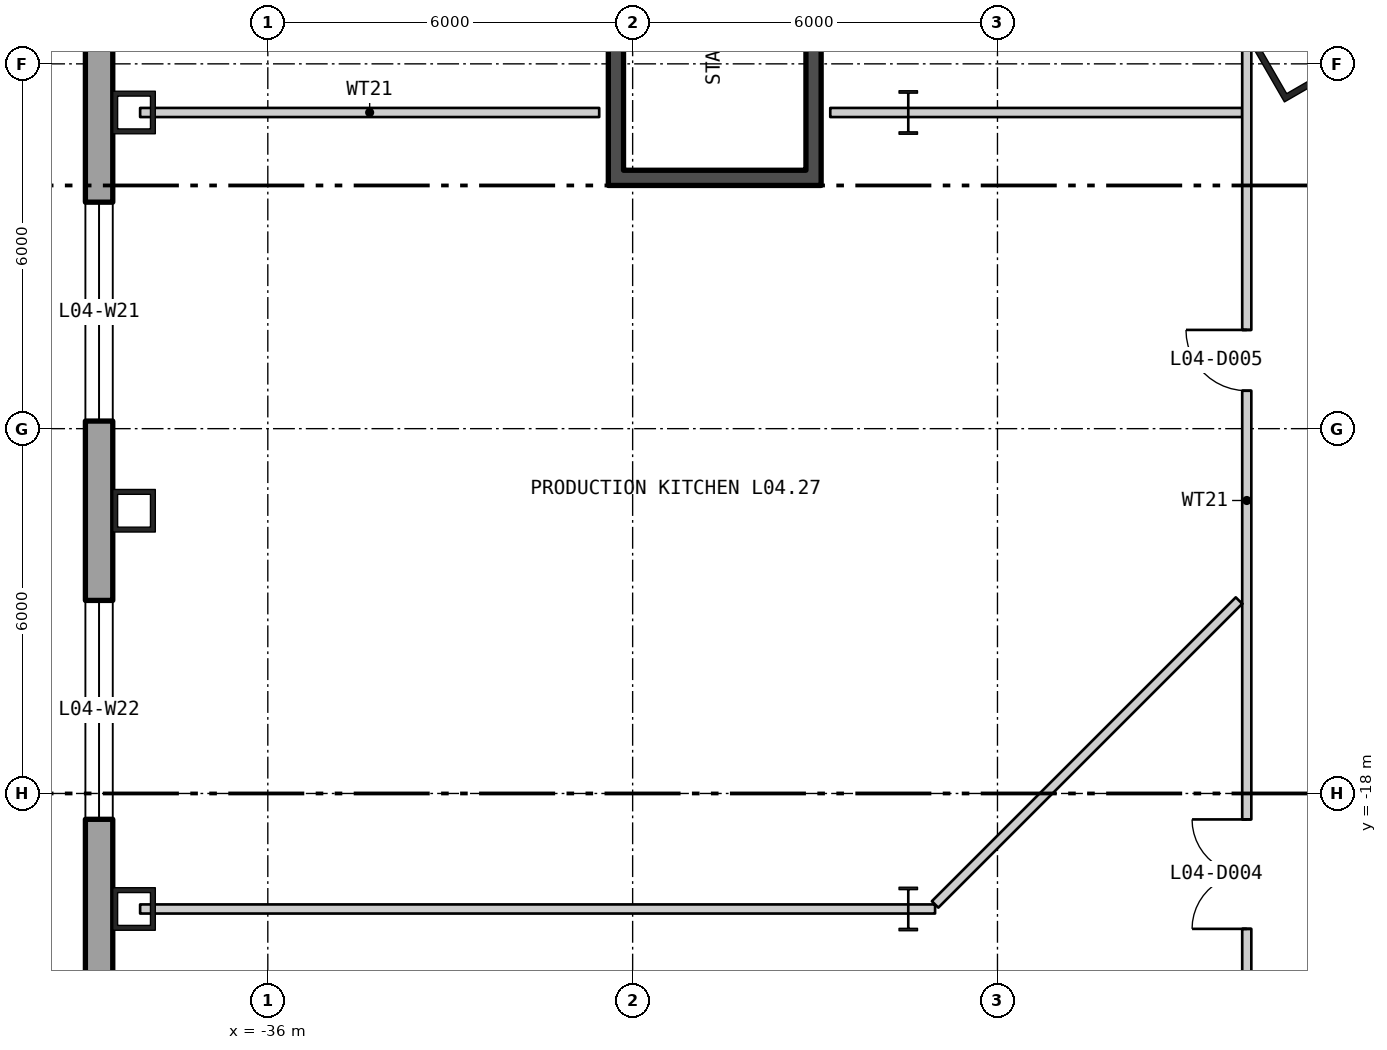
"""IFC4 building model, lengths in metres.
Left out: names, types, materials, properties, quantities, classifications, styles, units other than length and angle.
Written with IfcOpenShell. Run it as: python <this file> out.ifc"""

import sys

from ifc_helpers import new_model, si_unit, direction, frame, frame_2d, origin, origin_2d, place, context, subcontext, project, spatial, polyline, rectangle, hollow_rectangle, i_section, outline, extrude, element, fill, save


model = new_model("IFC4")
c1 = context("Model", 3, precision=1e-05, world=origin(), true_north=direction((0.0, 1.0)))
c2 = subcontext(c1, "Body", "Model", "MODEL_VIEW")
j1 = project(units=[si_unit("LENGTHUNIT", "METRE"), si_unit("PLANEANGLEUNIT", "RADIAN")], contexts=[c1])
p1 = place(None, origin())
s1 = spatial("IfcSite", under=j1, at=p1, CompositionType="ELEMENT")
p2 = place(p1, origin())
s2 = spatial("IfcBuilding", under=s1, at=p2, CompositionType="ELEMENT")
p3 = place(p2, frame((0.0, 0.0, 23.7)))
s3 = spatial("IfcBuildingStorey", under=s2, at=p3, CompositionType="ELEMENT", Elevation=23.7)
p4 = place(p3, frame((-19.061, -5.807, 0.0), z_axis=(0.0, 0.0, 1.0), x_axis=(0.5, -0.866025403784, 0.0)))
e1 = element("IfcColumn", 1, at=p4, inside=s3, PredefinedType="COLUMN", context=c2, shape_type="SweptSolid", body=[
    extrude(hollow_rectangle(XDim=1.2, YDim=1.2, WallThickness=0.1, at=origin_2d()), origin(), (0.0, 0.0, 1.0), 5.1),
])
for number, where, z_axis, x_axis in (
    (2, (-38.2, -6.8, 0.0), (0.0, 0.0, 1.0), (0.0, -1.0, 0.0)),
    (3, (-38.2, -13.35, 0.0), (0.0, 0.0, 1.0), (0.0, -1.0, 0.0)),
    (4, (-38.2, -19.9, 0.0), (0.0, 0.0, 1.0), (0.0, -1.0, 0.0)),
):
    element("IfcColumn", number, at=place(p3, frame(where, z_axis=z_axis, x_axis=x_axis)), inside=s3, PredefinedType="COLUMN", context=c2, shape_type="SweptSolid", body=[
        extrude(hollow_rectangle(XDim=0.7, YDim=0.7, WallThickness=0.08, at=origin_2d()), origin(), (0.0, 0.0, 1.0), 4.85),
    ])
for number, where, z_axis, x_axis in (
    (5, (-25.467, -6.8, 0.0), (0.0, 0.0, 1.0), (1.0, 0.0, 0.0)),
    (6, (-25.467, -19.9, 0.0), (0.0, 0.0, 1.0), (1.0, 0.0, 0.0)),
):
    element("IfcColumn", number, at=place(p3, frame(where, z_axis=z_axis, x_axis=x_axis)), inside=s3, PredefinedType="COLUMN", context=c2, shape_type="SweptSolid", body=[
        extrude(i_section(OverallWidth=0.304, OverallDepth=0.716, WebThickness=0.021, FlangeThickness=0.04, at=origin_2d()), origin(), (0.0, 0.0, 1.0), 4.85),
    ])
p5 = place(p3, frame((-38.775, 19.975, -0.4), z_axis=(0.0, 0.0, 1.0), x_axis=(0.0, -1.0, 0.0)))
e7 = element("IfcWall", 7, at=p5, inside=s3, PredefinedType="SOLIDWALL", context=c2, shape_type="SweptSolid", body=[
    extrude(outline(polyline([(-0.225, -0.225), (53.775, -0.225), (53.325, 0.225), (0.225, 0.225), (-0.225, -0.225)])), origin(), (0.0, 0.0, 1.0), 5.1),
])
p6 = place(p5, frame((2.05, 0.0, 1.3)))
e8 = element("IfcOpeningElement", 8, at=p6, cuts=e7, PredefinedType="OPENING", context=c2, shape_type="SweptSolid", body=[
    extrude(rectangle(XDim=3.6, YDim=3.2, at=frame_2d((1.8, 1.6))), frame((0.0, 0.235, 0.0), z_axis=(0.0, -1.0, 0.0), x_axis=(1.0, 0.0, 0.0)), (0.0, 0.0, 1.0), 0.47),
])
p7 = place(p5, frame((8.6, 0.0, 1.3)))
e9 = element("IfcOpeningElement", 9, at=p7, cuts=e7, PredefinedType="OPENING", context=c2, shape_type="SweptSolid", body=[
    extrude(rectangle(XDim=3.6, YDim=3.2, at=frame_2d((1.8, 1.6))), frame((0.0, 0.235, 0.0), z_axis=(0.0, -1.0, 0.0), x_axis=(1.0, 0.0, 0.0)), (0.0, 0.0, 1.0), 0.47),
])
p8 = place(p5, frame((15.15, 0.0, 1.3)))
e10 = element("IfcOpeningElement", 10, at=p8, cuts=e7, PredefinedType="OPENING", context=c2, shape_type="SweptSolid", body=[
    extrude(rectangle(XDim=3.6, YDim=3.2, at=frame_2d((1.8, 1.6))), frame((0.0, 0.235, 0.0), z_axis=(0.0, -1.0, 0.0), x_axis=(1.0, 0.0, 0.0)), (0.0, 0.0, 1.0), 0.47),
])
p9 = place(p5, frame((21.7, 0.0, 1.3)))
e11 = element("IfcOpeningElement", 11, at=p9, cuts=e7, PredefinedType="OPENING", context=c2, shape_type="SweptSolid", body=[
    extrude(rectangle(XDim=3.6, YDim=3.2, at=frame_2d((1.8, 1.6))), frame((0.0, 0.235, 0.0), z_axis=(0.0, -1.0, 0.0), x_axis=(1.0, 0.0, 0.0)), (0.0, 0.0, 1.0), 0.47),
])
p10 = place(p5, frame((28.25, 0.0, 1.3)))
e12 = element("IfcOpeningElement", 12, at=p10, cuts=e7, PredefinedType="OPENING", context=c2, shape_type="SweptSolid", body=[
    extrude(rectangle(XDim=3.6, YDim=3.2, at=frame_2d((1.8, 1.6))), frame((0.0, 0.235, 0.0), z_axis=(0.0, -1.0, 0.0), x_axis=(1.0, 0.0, 0.0)), (0.0, 0.0, 1.0), 0.47),
])
p11 = place(p5, frame((34.8, 0.0, 1.3)))
e13 = element("IfcOpeningElement", 13, at=p11, cuts=e7, PredefinedType="OPENING", context=c2, shape_type="SweptSolid", body=[
    extrude(rectangle(XDim=3.6, YDim=3.2, at=frame_2d((1.8, 1.6))), frame((0.0, 0.235, 0.0), z_axis=(0.0, -1.0, 0.0), x_axis=(1.0, 0.0, 0.0)), (0.0, 0.0, 1.0), 0.47),
])
p12 = place(p5, frame((41.35, 0.0, 1.3)))
e14 = element("IfcOpeningElement", 14, at=p12, cuts=e7, PredefinedType="OPENING", context=c2, shape_type="SweptSolid", body=[
    extrude(rectangle(XDim=3.6, YDim=3.2, at=frame_2d((1.8, 1.6))), frame((0.0, 0.235, 0.0), z_axis=(0.0, -1.0, 0.0), x_axis=(1.0, 0.0, 0.0)), (0.0, 0.0, 1.0), 0.47),
])
p13 = place(p5, frame((47.9, 0.0, 1.3)))
e15 = element("IfcOpeningElement", 15, at=p13, cuts=e7, PredefinedType="OPENING", context=c2, shape_type="SweptSolid", body=[
    extrude(rectangle(XDim=3.6, YDim=3.2, at=frame_2d((1.8, 1.6))), frame((0.0, 0.235, 0.0), z_axis=(0.0, -1.0, 0.0), x_axis=(1.0, 0.0, 0.0)), (0.0, 0.0, 1.0), 0.47),
])
p14 = place(p3, frame((-30.275, -7.75, 0.0), z_axis=(0.0, 0.0, 1.0), x_axis=(0.0, 1.0, 0.0)))
e16 = element("IfcWall", 16, at=p14, inside=s3, PredefinedType="SHEAR", context=c2, shape_type="SweptSolid", body=[
    extrude(rectangle(XDim=7.3, YDim=0.25, at=frame_2d((3.65, 0.0))), origin(), (0.0, 0.0, 1.0), 4.85),
])
p15 = place(p3, frame((-27.025, -7.75, 0.0), z_axis=(0.0, 0.0, 1.0), x_axis=(0.0, 1.0, 0.0)))
e17 = element("IfcWall", 17, at=p15, inside=s3, PredefinedType="SHEAR", context=c2, shape_type="SweptSolid", body=[
    extrude(rectangle(XDim=7.3, YDim=0.25, at=frame_2d((3.65, 0.0))), origin(), (0.0, 0.0, 1.0), 4.85),
])
p16 = place(p15, frame((5.7, 0.0, 0.0)))
e18 = element("IfcOpeningElement", 18, at=p16, cuts=e17, PredefinedType="OPENING", context=c2, shape_type="SweptSolid", body=[
    extrude(rectangle(XDim=1.2, YDim=2.1, at=frame_2d((0.6, 1.05))), frame((0.0, 0.135, 0.0), z_axis=(0.0, -1.0, 0.0), x_axis=(1.0, 0.0, 0.0)), (0.0, 0.0, 1.0), 0.27),
])
p17 = place(p3, frame((-30.4, -7.875, 0.0), z_axis=(0.0, 0.0, 1.0), x_axis=(1.0, 0.0, 0.0)))
e19 = element("IfcWall", 19, at=p17, inside=s3, PredefinedType="SHEAR", context=c2, shape_type="SweptSolid", body=[
    extrude(rectangle(XDim=3.5, YDim=0.25, at=frame_2d((1.75, 0.0))), origin(), (0.0, 0.0, 1.0), 4.85),
])
p18 = place(p3, frame((-38.1, -19.9, 0.0), z_axis=(0.0, 0.0, 1.0), x_axis=(1.0, 0.0, 0.0)))
e20 = element("IfcWall", 20, at=p18, inside=s3, PredefinedType="PARTITIONING", context=c2, shape_type="SweptSolid", body=[
    extrude(rectangle(XDim=12.633, YDim=0.15, at=frame_2d((6.316, 0.0))), origin(), (0.0, 0.0, 1.0), 4.06),
])
p19 = place(p3, frame((-25.467, -19.9, 0.0), z_axis=(0.0, 0.0, 1.0), x_axis=(1.0, 0.0, 0.0)))
e21 = element("IfcWall", 21, at=p19, inside=s3, PredefinedType="PARTITIONING", context=c2, shape_type="SweptSolid", body=[
    extrude(rectangle(XDim=0.441, YDim=0.15, at=frame_2d((0.221, 0.0))), origin(), (0.0, 0.0, 1.0), 4.85),
])
p20 = place(p3, frame((-38.1, -6.8, 0.0), z_axis=(0.0, 0.0, 1.0), x_axis=(1.0, 0.0, 0.0)))
e22 = element("IfcWall", 22, at=p20, inside=s3, PredefinedType="PARTITIONING", context=c2, shape_type="SweptSolid", body=[
    extrude(rectangle(XDim=7.55, YDim=0.15, at=frame_2d((3.775, 0.0))), origin(), (0.0, 0.0, 1.0), 4.06),
])
p21 = place(p3, frame((-26.75, -6.8, 0.0), z_axis=(0.0, 0.0, 1.0), x_axis=(1.0, 0.0, 0.0)))
e23 = element("IfcWall", 23, at=p21, inside=s3, PredefinedType="PARTITIONING", context=c2, shape_type="SweptSolid", body=[
    extrude(rectangle(XDim=1.283, YDim=0.15, at=frame_2d((0.641, 0.0))), origin(), (0.0, 0.0, 1.0), 4.06),
])
p22 = place(p3, frame((-25.467, -6.8, 0.0), z_axis=(0.0, 0.0, 1.0), x_axis=(1.0, 0.0, 0.0)))
e24 = element("IfcWall", 24, at=p22, inside=s3, PredefinedType="PARTITIONING", context=c2, shape_type="SweptSolid", body=[
    extrude(rectangle(XDim=5.492, YDim=0.15, at=frame_2d((2.746, 0.0))), origin(), (0.0, 0.0, 1.0), 4.16),
])
p23 = place(p3, frame((-25.026, -19.825, 0.0), z_axis=(0.0, 0.0, 1.0), x_axis=(0.707106781187, 0.707106781187, 0.0)))
e25 = element("IfcWall", 25, at=p23, inside=s3, PredefinedType="PARTITIONING", context=c2, shape_type="SweptSolid", body=[
    extrude(rectangle(XDim=7.068, YDim=0.15, at=frame_2d((3.534, 0.0))), origin(), (0.0, 0.0, 1.0), 4.85),
])
p24 = place(p3, frame((-19.9, -23.775, 0.0), z_axis=(0.0, 0.0, 1.0), x_axis=(0.0, 1.0, 0.0)))
e26 = element("IfcWall", 26, at=p24, inside=s3, PredefinedType="PARTITIONING", context=c2, shape_type="SweptSolid", body=[
    extrude(rectangle(XDim=21.187, YDim=0.15, at=frame_2d((10.594, 0.0))), origin(), (0.0, 0.0, 1.0), 4.85),
])
p25 = place(p24, frame((3.548, 0.0, 0.0)))
e27 = element("IfcOpeningElement", 27, at=p25, cuts=e26, PredefinedType="OPENING", context=c2, shape_type="SweptSolid", body=[
    extrude(rectangle(XDim=1.8, YDim=2.1, at=frame_2d((0.9, 1.05))), frame((0.0, 0.085, 0.0), z_axis=(0.0, -1.0, 0.0), x_axis=(1.0, 0.0, 0.0)), (0.0, 0.0, 1.0), 0.17),
])
p26 = place(p24, frame((12.399, 0.0, 0.0)))
e28 = element("IfcOpeningElement", 28, at=p26, cuts=e26, PredefinedType="OPENING", context=c2, shape_type="SweptSolid", body=[
    extrude(rectangle(XDim=1.0, YDim=2.1, at=frame_2d((0.5, 1.05))), frame((0.0, 0.085, 0.0), z_axis=(0.0, -1.0, 0.0), x_axis=(1.0, 0.0, 0.0)), (0.0, 0.0, 1.0), 0.17),
])
p27 = place(p10, origin())
e29 = element("IfcWindow", 29, at=p27, inside=s3, PartitioningType="SINGLE_PANEL", PredefinedType="WINDOW", context=c2, shape_type="SweptSolid", body=[
    extrude(rectangle(XDim=3.6, YDim=3.2, at=frame_2d((1.8, 1.6))), frame((0.0, 0.105, 0.0), z_axis=(0.0, -1.0, 0.0), x_axis=(1.0, 0.0, 0.0)), (0.0, 0.0, 1.0), 0.06),
])
fill(e12, e29)
p28 = place(p11, origin())
e30 = element("IfcWindow", 30, at=p28, inside=s3, PartitioningType="SINGLE_PANEL", PredefinedType="WINDOW", context=c2, shape_type="SweptSolid", body=[
    extrude(rectangle(XDim=3.6, YDim=3.2, at=frame_2d((1.8, 1.6))), frame((0.0, 0.105, 0.0), z_axis=(0.0, -1.0, 0.0), x_axis=(1.0, 0.0, 0.0)), (0.0, 0.0, 1.0), 0.06),
])
fill(e13, e30)
p29 = place(p25, origin())
e31 = element("IfcDoor", 31, at=p29, inside=s3, OperationType="DOUBLE_DOOR_SINGLE_SWING", PredefinedType="DOOR", context=c2, shape_type="SweptSolid", body=[
    extrude(rectangle(XDim=1.8, YDim=2.1, at=frame_2d((0.9, 1.05))), frame((0.0, 0.025, 0.0), z_axis=(0.0, -1.0, 0.0), x_axis=(1.0, 0.0, 0.0)), (0.0, 0.0, 1.0), 0.05),
])
fill(e27, e31)
p30 = place(p26, origin())
e32 = element("IfcDoor", 32, at=p30, inside=s3, OperationType="SINGLE_SWING_LEFT", PredefinedType="DOOR", context=c2, shape_type="SweptSolid", body=[
    extrude(rectangle(XDim=1.0, YDim=2.1, at=frame_2d((0.5, 1.05))), frame((0.0, 0.025, 0.0), z_axis=(0.0, -1.0, 0.0), x_axis=(1.0, 0.0, 0.0)), (0.0, 0.0, 1.0), 0.05),
])
fill(e28, e32)
save(model, sys.argv[1])
